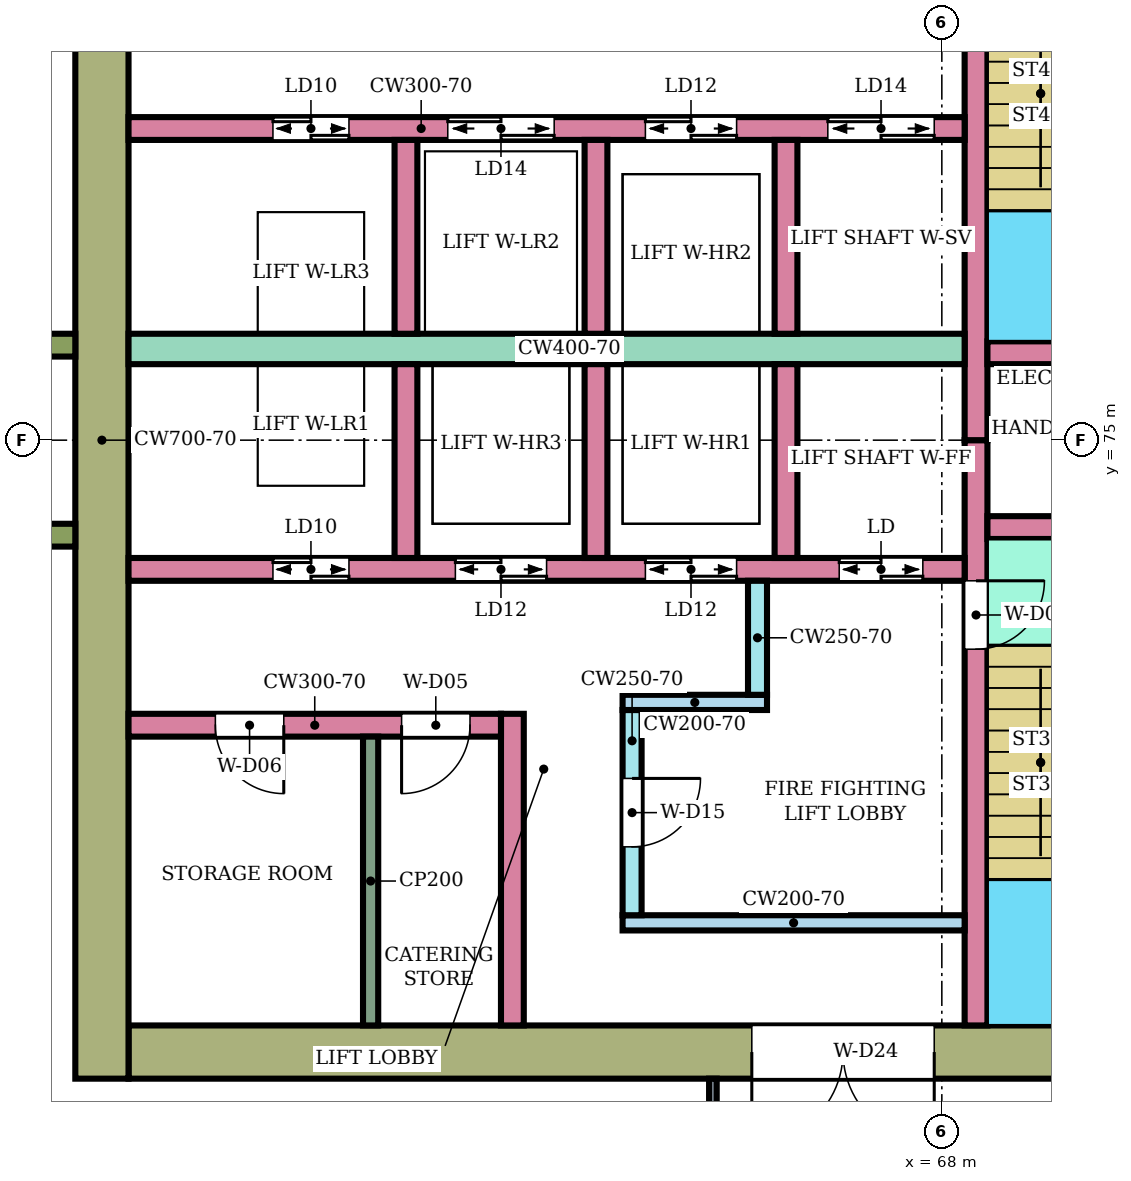
"""IFC4 building model, lengths in metres.
Left out: names, types, materials, properties, quantities, classifications, styles, units other than length and angle.
Written with IfcOpenShell. Run it as: python <this file> out.ifc"""

import sys

from ifc_helpers import new_model, si_unit, direction, frame, frame_2d, origin, place, context, subcontext, project, spatial, rectangle, extrude, element, fill, save


model = new_model("IFC4")
c1 = context("Model", 3, precision=1e-05, world=origin(), true_north=direction((0.0, 1.0)))
c2 = subcontext(c1, "Body", "Model", "MODEL_VIEW")
j1 = project(units=[si_unit("LENGTHUNIT", "METRE"), si_unit("PLANEANGLEUNIT", "RADIAN")], contexts=[c1])
p1 = place(None, origin())
s1 = spatial("IfcSite", under=j1, at=p1, CompositionType="ELEMENT")
p2 = place(p1, origin())
s2 = spatial("IfcBuilding", under=s1, at=p2, CompositionType="ELEMENT")
p3 = place(p2, frame((0.0, 0.0, 149.7)))
s3 = spatial("IfcBuildingStorey", under=s2, at=p3, CompositionType="ELEMENT", Elevation=149.7)
p4 = place(p3, frame((72.1, 66.95, 0.0), z_axis=(0.0, 0.0, 1.0), x_axis=(-1.0, 0.0, 0.0)))
e1 = element("IfcWall", 1, at=p4, inside=s3, PredefinedType="SHEAR", context=c2, shape_type="SweptSolid", body=[
    extrude(rectangle(XDim=14.8, YDim=0.7, at=frame_2d((7.4, 0.0))), origin(), (0.0, 0.0, 1.0), 7.68),
])
p5 = place(p4, frame((4.2, 0.0, 0.0)))
e2 = element("IfcOpeningElement", 2, at=p5, cuts=e1, PredefinedType="OPENING", context=c2, shape_type="SweptSolid", body=[
    extrude(rectangle(XDim=2.4, YDim=2.4, at=frame_2d((1.2, 1.2))), frame((0.0, 0.36, 0.0), z_axis=(0.0, -1.0, 0.0), x_axis=(1.0, 0.0, 0.0)), (0.0, 0.0, 1.0), 0.72),
])
p6 = place(p3, frame((56.95, 83.4, 0.0), z_axis=(0.0, 0.0, 1.0), x_axis=(0.0, -1.0, 0.0)))
e3 = element("IfcWall", 3, at=p6, inside=s3, PredefinedType="SHEAR", context=c2, shape_type="SweptSolid", body=[
    extrude(rectangle(XDim=16.8, YDim=0.7, at=frame_2d((8.4, 0.0))), origin(), (0.0, 0.0, 1.0), 7.68),
])
p7 = place(p3, frame((68.45, 75.0, 0.0), z_axis=(0.0, 0.0, 1.0), x_axis=(0.0, -1.0, 0.0)))
e4 = element("IfcWall", 4, at=p7, inside=s3, PredefinedType="SHEAR", context=c2, shape_type="SweptSolid", body=[
    extrude(rectangle(XDim=7.7, YDim=0.3, at=frame_2d((3.85, 0.0))), origin(), (0.0, 0.0, 1.0), 7.68),
])
p8 = place(p7, frame((1.85, 0.0, 0.0)))
e5 = element("IfcOpeningElement", 5, at=p8, cuts=e4, PredefinedType="OPENING", context=c2, shape_type="SweptSolid", body=[
    extrude(rectangle(XDim=0.9, YDim=2.1, at=frame_2d((0.45, 1.05))), frame((0.0, 0.16, 0.0), z_axis=(0.0, -1.0, 0.0), x_axis=(1.0, 0.0, 0.0)), (0.0, 0.0, 1.0), 0.32),
])
p9 = place(p3, frame((68.45, 82.7, 0.0), z_axis=(0.0, 0.0, 1.0), x_axis=(0.0, -1.0, 0.0)))
e6 = element("IfcWall", 6, at=p9, inside=s3, PredefinedType="SHEAR", context=c2, shape_type="SweptSolid", body=[
    extrude(rectangle(XDim=7.7, YDim=0.3, at=frame_2d((3.85, 0.0))), origin(), (0.0, 0.0, 1.0), 7.68),
])
p10 = place(p9, frame((0.35, 0.0, 0.0)))
e7 = element("IfcOpeningElement", 7, at=p10, cuts=e6, PredefinedType="OPENING", context=c2, shape_type="SweptSolid", body=[
    extrude(rectangle(XDim=0.9, YDim=2.1, at=frame_2d((0.45, 1.05))), frame((0.0, 0.16, 0.0), z_axis=(0.0, -1.0, 0.0), x_axis=(1.0, 0.0, 0.0)), (0.0, 0.0, 1.0), 0.32),
])
p11 = place(p3, frame((71.65, 73.85, 0.0), z_axis=(0.0, 0.0, 1.0), x_axis=(-1.0, 0.0, 0.0)))
e8 = element("IfcWall", 8, at=p11, inside=s3, PredefinedType="SHEAR", context=c2, shape_type="SweptSolid", body=[
    extrude(rectangle(XDim=3.05, YDim=0.3, at=frame_2d((1.525, 0.0))), origin(), (0.0, 0.0, 1.0), 7.68),
])
p12 = place(p11, frame((1.1, 0.0, 0.0)))
e9 = element("IfcOpeningElement", 9, at=p12, cuts=e8, PredefinedType="OPENING", context=c2, shape_type="SweptSolid", body=[
    extrude(rectangle(XDim=0.7, YDim=2.0, at=frame_2d((0.35, 1.0))), frame((0.0, 0.16, 0.0), z_axis=(0.0, -1.0, 0.0), x_axis=(1.0, 0.0, 0.0)), (0.0, 0.0, 1.0), 0.32),
])
p13 = place(p3, frame((71.65, 76.15, 0.0), z_axis=(0.0, 0.0, 1.0), x_axis=(-1.0, 0.0, 0.0)))
e10 = element("IfcWall", 10, at=p13, inside=s3, PredefinedType="SHEAR", context=c2, shape_type="SweptSolid", body=[
    extrude(rectangle(XDim=3.05, YDim=0.3, at=frame_2d((1.525, 0.0))), origin(), (0.0, 0.0, 1.0), 7.68),
])
p14 = place(p3, frame((68.3, 73.3, 0.0), z_axis=(0.0, 0.0, 1.0), x_axis=(-1.0, 0.0, 0.0)))
e11 = element("IfcWall", 11, at=p14, inside=s3, PredefinedType="SHEAR", context=c2, shape_type="SweptSolid", body=[
    extrude(rectangle(XDim=11.0, YDim=0.3, at=frame_2d((5.5, 0.0))), origin(), (0.0, 0.0, 1.0), 7.68),
])
p15 = place(p14, frame((0.55, 0.0, 0.0)))
e12 = element("IfcOpeningElement", 12, at=p15, cuts=e11, PredefinedType="OPENING", context=c2, shape_type="SweptSolid", body=[
    extrude(rectangle(XDim=1.1, YDim=2.1, at=frame_2d((0.55, 1.05))), frame((0.0, 0.16, 0.0), z_axis=(0.0, -1.0, 0.0), x_axis=(1.0, 0.0, 0.0)), (0.0, 0.0, 1.0), 0.32),
])
p16 = place(p14, frame((3.0, 0.0, 0.0)))
e13 = element("IfcOpeningElement", 13, at=p16, cuts=e11, PredefinedType="OPENING", context=c2, shape_type="SweptSolid", body=[
    extrude(rectangle(XDim=1.2, YDim=2.1, at=frame_2d((0.6, 1.05))), frame((0.0, 0.16, 0.0), z_axis=(0.0, -1.0, 0.0), x_axis=(1.0, 0.0, 0.0)), (0.0, 0.0, 1.0), 0.32),
])
p17 = place(p14, frame((5.5, 0.0, 0.0)))
e14 = element("IfcOpeningElement", 14, at=p17, cuts=e11, PredefinedType="OPENING", context=c2, shape_type="SweptSolid", body=[
    extrude(rectangle(XDim=1.2, YDim=2.1, at=frame_2d((0.6, 1.05))), frame((0.0, 0.16, 0.0), z_axis=(0.0, -1.0, 0.0), x_axis=(1.0, 0.0, 0.0)), (0.0, 0.0, 1.0), 0.32),
])
p18 = place(p14, frame((8.1, 0.0, 0.0)))
e15 = element("IfcOpeningElement", 15, at=p18, cuts=e11, PredefinedType="OPENING", context=c2, shape_type="SweptSolid", body=[
    extrude(rectangle(XDim=1.0, YDim=2.1, at=frame_2d((0.5, 1.05))), frame((0.0, 0.16, 0.0), z_axis=(0.0, -1.0, 0.0), x_axis=(1.0, 0.0, 0.0)), (0.0, 0.0, 1.0), 0.32),
])
p19 = place(p3, frame((68.3, 76.2, 0.0), z_axis=(0.0, 0.0, 1.0), x_axis=(-1.0, 0.0, 0.0)))
e16 = element("IfcWall", 16, at=p19, inside=s3, PredefinedType="SHEAR", context=c2, shape_type="SweptSolid", body=[
    extrude(rectangle(XDim=11.0, YDim=0.4, at=frame_2d((5.5, 0.0))), origin(), (0.0, 0.0, 1.0), 7.68),
])
p20 = place(p3, frame((68.3, 79.1, 0.0), z_axis=(0.0, 0.0, 1.0), x_axis=(-1.0, 0.0, 0.0)))
e17 = element("IfcWall", 17, at=p20, inside=s3, PredefinedType="SHEAR", context=c2, shape_type="SweptSolid", body=[
    extrude(rectangle(XDim=11.0, YDim=0.3, at=frame_2d((5.5, 0.0))), origin(), (0.0, 0.0, 1.0), 7.68),
])
p21 = place(p20, frame((0.4, 0.0, 0.0)))
e18 = element("IfcOpeningElement", 18, at=p21, cuts=e17, PredefinedType="OPENING", context=c2, shape_type="SweptSolid", body=[
    extrude(rectangle(XDim=1.4, YDim=2.1, at=frame_2d((0.7, 1.05))), frame((0.0, 0.16, 0.0), z_axis=(0.0, -1.0, 0.0), x_axis=(1.0, 0.0, 0.0)), (0.0, 0.0, 1.0), 0.32),
])
p22 = place(p20, frame((3.0, 0.0, 0.0)))
e19 = element("IfcOpeningElement", 19, at=p22, cuts=e17, PredefinedType="OPENING", context=c2, shape_type="SweptSolid", body=[
    extrude(rectangle(XDim=1.2, YDim=2.1, at=frame_2d((0.6, 1.05))), frame((0.0, 0.16, 0.0), z_axis=(0.0, -1.0, 0.0), x_axis=(1.0, 0.0, 0.0)), (0.0, 0.0, 1.0), 0.32),
])
p23 = place(p20, frame((5.4, 0.0, 0.0)))
e20 = element("IfcOpeningElement", 20, at=p23, cuts=e17, PredefinedType="OPENING", context=c2, shape_type="SweptSolid", body=[
    extrude(rectangle(XDim=1.4, YDim=2.1, at=frame_2d((0.7, 1.05))), frame((0.0, 0.16, 0.0), z_axis=(0.0, -1.0, 0.0), x_axis=(1.0, 0.0, 0.0)), (0.0, 0.0, 1.0), 0.32),
])
p24 = place(p20, frame((8.1, 0.0, 0.0)))
e21 = element("IfcOpeningElement", 21, at=p24, cuts=e17, PredefinedType="OPENING", context=c2, shape_type="SweptSolid", body=[
    extrude(rectangle(XDim=1.0, YDim=2.1, at=frame_2d((0.5, 1.05))), frame((0.0, 0.16, 0.0), z_axis=(0.0, -1.0, 0.0), x_axis=(1.0, 0.0, 0.0)), (0.0, 0.0, 1.0), 0.32),
])
for number, where, z_axis, x_axis in (
    (22, (65.95, 76.0, 0.0), (0.0, 0.0, 1.0), (0.0, -1.0, 0.0)),
    (23, (63.45, 76.0, 0.0), (0.0, 0.0, 1.0), (0.0, -1.0, 0.0)),
    (24, (60.95, 76.0, 0.0), (0.0, 0.0, 1.0), (0.0, -1.0, 0.0)),
    (25, (65.95, 78.95, 0.0), (0.0, 0.0, 1.0), (0.0, -1.0, 0.0)),
    (26, (63.45, 78.95, 0.0), (0.0, 0.0, 1.0), (0.0, -1.0, 0.0)),
    (27, (60.95, 78.95, 0.0), (0.0, 0.0, 1.0), (0.0, -1.0, 0.0)),
):
    element("IfcWall", number, at=place(p3, frame(where, z_axis=z_axis, x_axis=x_axis)), inside=s3, PredefinedType="SHEAR", context=c2, shape_type="SweptSolid", body=[
        extrude(rectangle(XDim=2.55, YDim=0.3, at=frame_2d((1.275, 0.0))), origin(), (0.0, 0.0, 1.0), 7.68),
    ])
p25 = place(p3, frame((68.3, 68.65, 0.0), z_axis=(0.0, 0.0, 1.0), x_axis=(-1.0, 0.0, 0.0)))
e28 = element("IfcWall", 28, at=p25, inside=s3, PredefinedType="SHEAR", context=c2, shape_type="SweptSolid", body=[
    extrude(rectangle(XDim=4.5, YDim=0.2, at=frame_2d((2.25, 0.0))), origin(), (0.0, 0.0, 1.0), 7.68),
])
p26 = place(p3, frame((63.925, 71.45, 0.0), z_axis=(0.0, 0.0, 1.0), x_axis=(0.0, -1.0, 0.0)))
e29 = element("IfcWall", 29, at=p26, inside=s3, PredefinedType="SHEAR", context=c2, shape_type="SweptSolid", body=[
    extrude(rectangle(XDim=2.7, YDim=0.25, at=frame_2d((1.35, 0.0))), origin(), (0.0, 0.0, 1.0), 7.68),
])
p27 = place(p26, frame((0.9, 0.0, 0.0)))
e30 = element("IfcOpeningElement", 30, at=p27, cuts=e29, PredefinedType="OPENING", context=c2, shape_type="SweptSolid", body=[
    extrude(rectangle(XDim=0.9, YDim=2.1, at=frame_2d((0.45, 1.05))), frame((0.0, 0.135, 0.0), z_axis=(0.0, -1.0, 0.0), x_axis=(1.0, 0.0, 0.0)), (0.0, 0.0, 1.0), 0.27),
])
p28 = place(p3, frame((65.7, 71.55, 0.0), z_axis=(0.0, 0.0, 1.0), x_axis=(-1.0, 0.0, 0.0)))
e31 = element("IfcWall", 31, at=p28, inside=s3, PredefinedType="SHEAR", context=c2, shape_type="SweptSolid", body=[
    extrude(rectangle(XDim=1.9, YDim=0.2, at=frame_2d((0.95, 0.0))), origin(), (0.0, 0.0, 1.0), 7.68),
])
p29 = place(p3, frame((65.575, 73.15, 0.0), z_axis=(0.0, 0.0, 1.0), x_axis=(0.0, -1.0, 0.0)))
e32 = element("IfcWall", 32, at=p29, inside=s3, PredefinedType="SHEAR", context=c2, shape_type="SweptSolid", body=[
    extrude(rectangle(XDim=1.5, YDim=0.25, at=frame_2d((0.75, 0.0))), origin(), (0.0, 0.0, 1.0), 7.68),
])
p30 = place(p3, frame((62.35, 71.4, 0.0), z_axis=(0.0, 0.0, 1.0), x_axis=(0.0, -1.0, 0.0)))
e33 = element("IfcWall", 33, at=p30, inside=s3, PredefinedType="SHEAR", context=c2, shape_type="SweptSolid", body=[
    extrude(rectangle(XDim=4.1, YDim=0.3, at=frame_2d((2.05, 0.0))), origin(), (0.0, 0.0, 1.0), 7.68),
])
p31 = place(p3, frame((62.2, 71.25, 0.0), z_axis=(0.0, 0.0, 1.0), x_axis=(-1.0, 0.0, 0.0)))
e34 = element("IfcWall", 34, at=p31, inside=s3, PredefinedType="SHEAR", context=c2, shape_type="SweptSolid", body=[
    extrude(rectangle(XDim=4.9, YDim=0.3, at=frame_2d((2.45, 0.0))), origin(), (0.0, 0.0, 1.0), 7.68),
])
p32 = place(p31, frame((0.407, 0.0, 0.0)))
e35 = element("IfcOpeningElement", 35, at=p32, cuts=e34, PredefinedType="OPENING", context=c2, shape_type="SweptSolid", body=[
    extrude(rectangle(XDim=0.9, YDim=2.1, at=frame_2d((0.45, 1.05))), frame((0.0, 0.16, 0.0), z_axis=(0.0, -1.0, 0.0), x_axis=(1.0, 0.0, 0.0)), (0.0, 0.0, 1.0), 0.32),
])
p33 = place(p31, frame((2.857, 0.0, 0.0)))
e36 = element("IfcOpeningElement", 36, at=p33, cuts=e34, PredefinedType="OPENING", context=c2, shape_type="SweptSolid", body=[
    extrude(rectangle(XDim=0.9, YDim=2.1, at=frame_2d((0.45, 1.05))), frame((0.0, 0.16, 0.0), z_axis=(0.0, -1.0, 0.0), x_axis=(1.0, 0.0, 0.0)), (0.0, 0.0, 1.0), 0.32),
])
for number, where, z_axis, x_axis in (
    (37, (56.6, 76.25, 0.0), (0.0, 0.0, 1.0), (-1.0, 0.0, 0.0)),
    (38, (56.6, 73.75, 0.0), (0.0, 0.0, 1.0), (-1.0, 0.0, 0.0)),
):
    element("IfcWall", number, at=place(p3, frame(where, z_axis=z_axis, x_axis=x_axis)), inside=s3, PredefinedType="NOTDEFINED", context=c2, shape_type="SweptSolid", body=[
        extrude(rectangle(XDim=2.416, YDim=0.3, at=frame_2d((1.208, 0.0))), origin(), (0.0, 0.0, 1.0), 8.0),
    ])
p34 = place(p3, frame((64.988, 54.27, 0.0), z_axis=(0.0, 0.0, 1.0), x_axis=(0.0, 1.0, 0.0)))
e39 = element("IfcWall", 39, at=p34, inside=s3, PredefinedType="PARTITIONING", context=c2, shape_type="SweptSolid", body=[
    extrude(rectangle(XDim=12.33, YDim=0.1, at=frame_2d((6.165, 0.0))), origin(), (0.0, 0.0, 1.0), 7.55),
])
p35 = place(p34, frame((6.309, 0.0, 0.0)))
e40 = element("IfcOpeningElement", 40, at=p35, cuts=e39, PredefinedType="OPENING", context=c2, shape_type="SweptSolid", body=[
    extrude(rectangle(XDim=1.8, YDim=2.1, at=frame_2d((0.9, 1.05))), frame((0.0, 0.06, 0.0), z_axis=(0.0, -1.0, 0.0), x_axis=(1.0, 0.0, 0.0)), (0.0, 0.0, 1.0), 0.12),
])
p36 = place(p3, frame((60.485, 71.1, 0.0), z_axis=(0.0, 0.0, 1.0), x_axis=(0.0, -1.0, 0.0)))
e41 = element("IfcWall", 41, at=p36, inside=s3, PredefinedType="PARTITIONING", context=c2, shape_type="SweptSolid", body=[
    extrude(rectangle(XDim=3.8, YDim=0.2, at=frame_2d((1.9, 0.0))), origin(), (0.0, 0.0, 1.0), 7.68),
])
p37 = place(p8, origin())
e42 = element("IfcDoor", 42, at=p37, inside=s3, OperationType="SINGLE_SWING_LEFT", PredefinedType="DOOR", context=c2, shape_type="SweptSolid", body=[
    extrude(rectangle(XDim=0.9, YDim=2.1, at=frame_2d((0.45, 1.05))), frame((0.0, 0.025, 0.0), z_axis=(0.0, -1.0, 0.0), x_axis=(1.0, 0.0, 0.0)), (0.0, 0.0, 1.0), 0.05),
])
fill(e5, e42)
p38 = place(p15, origin())
e43 = element("IfcDoor", 43, at=p38, inside=s3, OperationType="DOUBLE_DOOR_SLIDING", PredefinedType="DOOR", context=c2, shape_type="SweptSolid", body=[
    extrude(rectangle(XDim=1.1, YDim=2.1, at=frame_2d((0.55, 1.05))), frame((0.0, 0.025, 0.0), z_axis=(0.0, -1.0, 0.0), x_axis=(1.0, 0.0, 0.0)), (0.0, 0.0, 1.0), 0.05),
])
fill(e12, e43)
p39 = place(p16, origin())
e44 = element("IfcDoor", 44, at=p39, inside=s3, OperationType="DOUBLE_DOOR_SLIDING", PredefinedType="DOOR", context=c2, shape_type="SweptSolid", body=[
    extrude(rectangle(XDim=1.2, YDim=2.1, at=frame_2d((0.6, 1.05))), frame((0.0, 0.025, 0.0), z_axis=(0.0, -1.0, 0.0), x_axis=(1.0, 0.0, 0.0)), (0.0, 0.0, 1.0), 0.05),
])
fill(e13, e44)
p40 = place(p17, origin())
e45 = element("IfcDoor", 45, at=p40, inside=s3, OperationType="DOUBLE_DOOR_SLIDING", PredefinedType="DOOR", context=c2, shape_type="SweptSolid", body=[
    extrude(rectangle(XDim=1.2, YDim=2.1, at=frame_2d((0.6, 1.05))), frame((0.0, 0.025, 0.0), z_axis=(0.0, -1.0, 0.0), x_axis=(1.0, 0.0, 0.0)), (0.0, 0.0, 1.0), 0.05),
])
fill(e14, e45)
p41 = place(p18, origin())
e46 = element("IfcDoor", 46, at=p41, inside=s3, OperationType="DOUBLE_DOOR_SLIDING", PredefinedType="DOOR", context=c2, shape_type="SweptSolid", body=[
    extrude(rectangle(XDim=1.0, YDim=2.1, at=frame_2d((0.5, 1.05))), frame((0.0, 0.025, 0.0), z_axis=(0.0, -1.0, 0.0), x_axis=(1.0, 0.0, 0.0)), (0.0, 0.0, 1.0), 0.05),
])
fill(e15, e46)
p42 = place(p21, origin())
e47 = element("IfcDoor", 47, at=p42, inside=s3, OperationType="DOUBLE_DOOR_SLIDING", PredefinedType="DOOR", context=c2, shape_type="SweptSolid", body=[
    extrude(rectangle(XDim=1.4, YDim=2.1, at=frame_2d((0.7, 1.05))), frame((0.0, 0.025, 0.0), z_axis=(0.0, -1.0, 0.0), x_axis=(1.0, 0.0, 0.0)), (0.0, 0.0, 1.0), 0.05),
])
fill(e18, e47)
p43 = place(p22, origin())
e48 = element("IfcDoor", 48, at=p43, inside=s3, OperationType="DOUBLE_DOOR_SLIDING", PredefinedType="DOOR", context=c2, shape_type="SweptSolid", body=[
    extrude(rectangle(XDim=1.2, YDim=2.1, at=frame_2d((0.6, 1.05))), frame((0.0, 0.025, 0.0), z_axis=(0.0, -1.0, 0.0), x_axis=(1.0, 0.0, 0.0)), (0.0, 0.0, 1.0), 0.05),
])
fill(e19, e48)
p44 = place(p23, origin())
e49 = element("IfcDoor", 49, at=p44, inside=s3, OperationType="DOUBLE_DOOR_SLIDING", PredefinedType="DOOR", context=c2, shape_type="SweptSolid", body=[
    extrude(rectangle(XDim=1.4, YDim=2.1, at=frame_2d((0.7, 1.05))), frame((0.0, 0.025, 0.0), z_axis=(0.0, -1.0, 0.0), x_axis=(1.0, 0.0, 0.0)), (0.0, 0.0, 1.0), 0.05),
])
fill(e20, e49)
p45 = place(p24, origin())
e50 = element("IfcDoor", 50, at=p45, inside=s3, OperationType="DOUBLE_DOOR_SLIDING", PredefinedType="DOOR", context=c2, shape_type="SweptSolid", body=[
    extrude(rectangle(XDim=1.0, YDim=2.1, at=frame_2d((0.5, 1.05))), frame((0.0, 0.025, 0.0), z_axis=(0.0, -1.0, 0.0), x_axis=(1.0, 0.0, 0.0)), (0.0, 0.0, 1.0), 0.05),
])
fill(e21, e50)
p46 = place(p27, origin())
e51 = element("IfcDoor", 51, at=p46, inside=s3, OperationType="SINGLE_SWING_LEFT", PredefinedType="DOOR", context=c2, shape_type="SweptSolid", body=[
    extrude(rectangle(XDim=0.9, YDim=2.1, at=frame_2d((0.45, 1.05))), frame((0.0, 0.025, 0.0), z_axis=(0.0, -1.0, 0.0), x_axis=(1.0, 0.0, 0.0)), (0.0, 0.0, 1.0), 0.05),
])
fill(e30, e51)
p47 = place(p32, origin())
e52 = element("IfcDoor", 52, at=p47, inside=s3, OperationType="SINGLE_SWING_RIGHT", PredefinedType="DOOR", context=c2, shape_type="SweptSolid", body=[
    extrude(rectangle(XDim=0.9, YDim=2.1, at=frame_2d((0.45, 1.05))), frame((0.0, 0.025, 0.0), z_axis=(0.0, -1.0, 0.0), x_axis=(1.0, 0.0, 0.0)), (0.0, 0.0, 1.0), 0.05),
])
fill(e35, e52)
p48 = place(p33, origin())
e53 = element("IfcDoor", 53, at=p48, inside=s3, OperationType="SINGLE_SWING_LEFT", PredefinedType="DOOR", context=c2, shape_type="SweptSolid", body=[
    extrude(rectangle(XDim=0.9, YDim=2.1, at=frame_2d((0.45, 1.05))), frame((0.0, 0.025, 0.0), z_axis=(0.0, -1.0, 0.0), x_axis=(1.0, 0.0, 0.0)), (0.0, 0.0, 1.0), 0.05),
])
fill(e36, e53)
p49 = place(p5, origin())
e54 = element("IfcDoor", 54, at=p49, inside=s3, OperationType="DOUBLE_DOOR_SINGLE_SWING", PredefinedType="DOOR", context=c2, shape_type="SweptSolid", body=[
    extrude(rectangle(XDim=2.4, YDim=2.4, at=frame_2d((1.2, 1.2))), frame((0.0, 0.025, 0.0), z_axis=(0.0, -1.0, 0.0), x_axis=(1.0, 0.0, 0.0)), (0.0, 0.0, 1.0), 0.05),
])
fill(e2, e54)
save(model, sys.argv[1])
